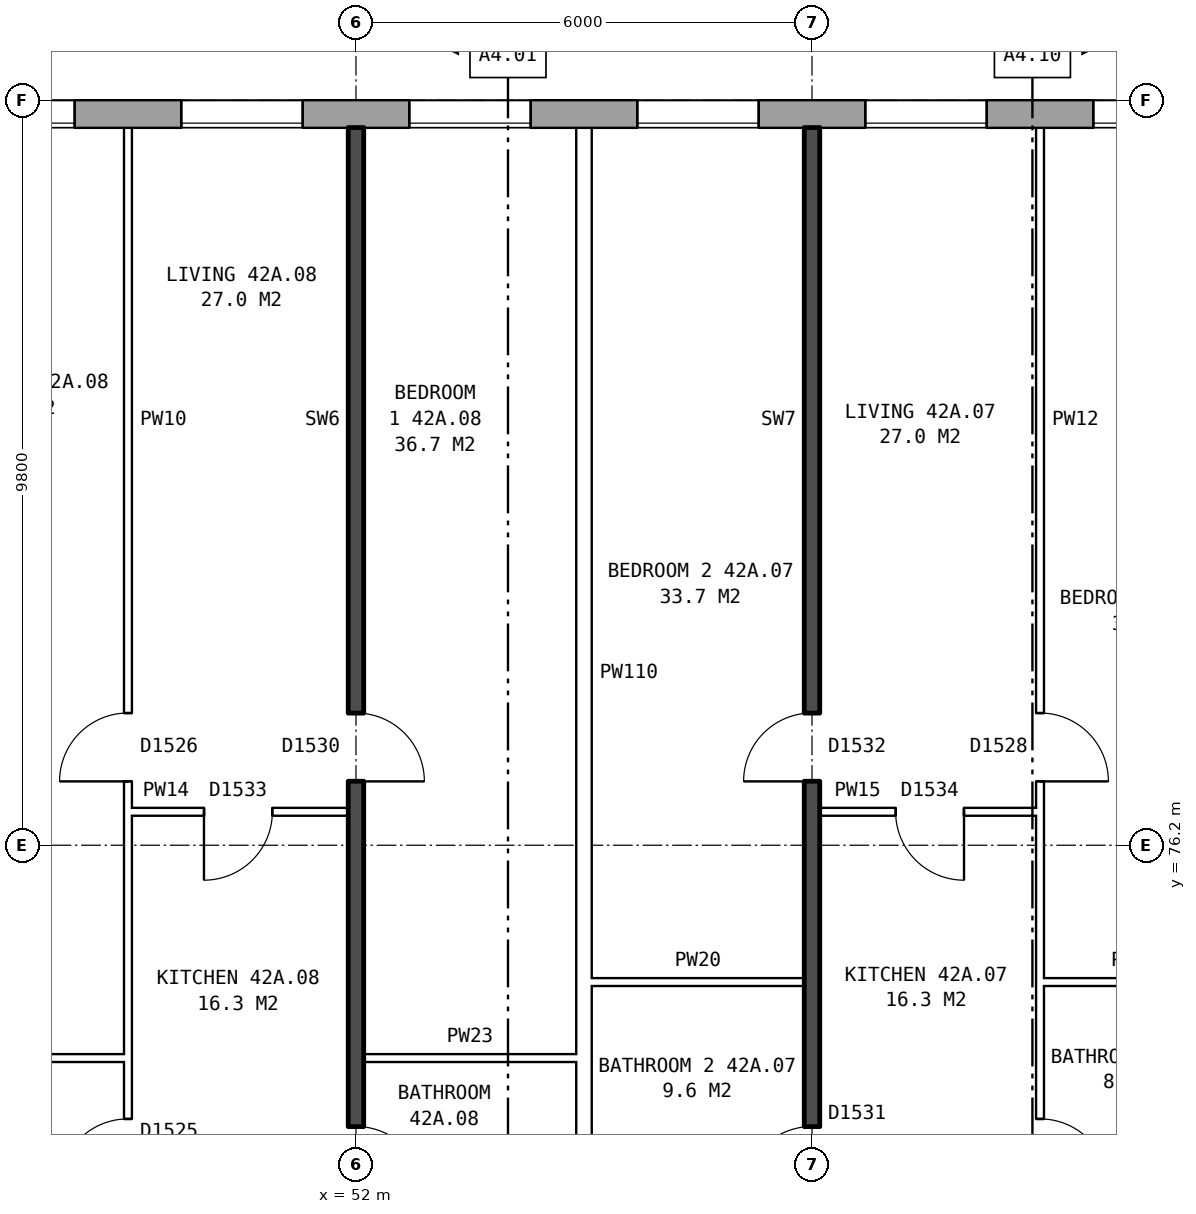
"""IFC4 building model, lengths in metres.
Left out: names, types, materials, properties, quantities, classifications, styles, units other than length and angle.
Written with IfcOpenShell. Run it as: python <this file> out.ifc"""

import sys

from ifc_helpers import new_model, si_unit, direction, frame, frame_2d, origin, place, context, subcontext, project, spatial, rectangle, extrude, element, fill, save


model = new_model("IFC4")
c1 = context("Model", 3, precision=1e-05, world=origin(), true_north=direction((0.0, 1.0)))
c2 = subcontext(c1, "Body", "Model", "MODEL_VIEW")
j1 = project(units=[si_unit("LENGTHUNIT", "METRE"), si_unit("PLANEANGLEUNIT", "RADIAN")], contexts=[c1])
p1 = place(None, origin())
s1 = spatial("IfcSite", under=j1, at=p1, CompositionType="ELEMENT")
p2 = place(p1, origin())
s2 = spatial("IfcBuilding", under=s1, at=p2, CompositionType="ELEMENT")
p3 = place(p2, frame((0.0, 0.0, 151.6)))
s3 = spatial("IfcBuildingStorey", under=s2, at=p3, CompositionType="ELEMENT", Elevation=151.6)
p4 = place(p3, frame((72.925, 85.82, 0.0), z_axis=(0.0, 0.0, 1.0), x_axis=(-1.0, 0.0, 0.0)))
e1 = element("IfcWall", 1, at=p4, inside=s3, PredefinedType="STANDARD", context=c2, shape_type="SweptSolid", body=[
    extrude(rectangle(XDim=41.351, YDim=0.36, at=frame_2d((20.675, 0.0))), origin(), (0.0, 0.0, 1.0), 2.85),
])
p5 = place(p4, frame((0.3, 0.0, 0.8)))
e2 = element("IfcOpeningElement", 2, at=p5, cuts=e1, PredefinedType="OPENING", context=c2, shape_type="SweptSolid", body=[
    extrude(rectangle(XDim=1.4, YDim=1.8, at=frame_2d((0.7, 0.9))), frame((0.0, 0.19, 0.0), z_axis=(0.0, -1.0, 0.0), x_axis=(1.0, 0.0, 0.0)), (0.0, 0.0, 1.0), 0.38),
])
p6 = place(p4, frame((4.225, 0.0, 0.8)))
e3 = element("IfcOpeningElement", 3, at=p6, cuts=e1, PredefinedType="OPENING", context=c2, shape_type="SweptSolid", body=[
    extrude(rectangle(XDim=1.0, YDim=0.9, at=frame_2d((0.5, 0.45))), frame((0.0, 0.19, 0.0), z_axis=(0.0, -1.0, 0.0), x_axis=(1.0, 0.0, 0.0)), (0.0, 0.0, 1.0), 0.38),
])
p7 = place(p4, frame((6.625, 0.0, 0.8)))
e4 = element("IfcOpeningElement", 4, at=p7, cuts=e1, PredefinedType="OPENING", context=c2, shape_type="SweptSolid", body=[
    extrude(rectangle(XDim=1.6, YDim=1.8, at=frame_2d((0.8, 0.9))), frame((0.0, 0.19, 0.0), z_axis=(0.0, -1.0, 0.0), x_axis=(1.0, 0.0, 0.0)), (0.0, 0.0, 1.0), 0.38),
])
p8 = place(p4, frame((9.625, 0.0, 0.8)))
e5 = element("IfcOpeningElement", 5, at=p8, cuts=e1, PredefinedType="OPENING", context=c2, shape_type="SweptSolid", body=[
    extrude(rectangle(XDim=1.6, YDim=1.8, at=frame_2d((0.8, 0.9))), frame((0.0, 0.19, 0.0), z_axis=(0.0, -1.0, 0.0), x_axis=(1.0, 0.0, 0.0)), (0.0, 0.0, 1.0), 0.38),
])
p9 = place(p4, frame((12.625, 0.0, 0.8)))
e6 = element("IfcOpeningElement", 6, at=p9, cuts=e1, PredefinedType="OPENING", context=c2, shape_type="SweptSolid", body=[
    extrude(rectangle(XDim=1.6, YDim=1.8, at=frame_2d((0.8, 0.9))), frame((0.0, 0.19, 0.0), z_axis=(0.0, -1.0, 0.0), x_axis=(1.0, 0.0, 0.0)), (0.0, 0.0, 1.0), 0.38),
])
p10 = place(p4, frame((15.625, 0.0, 0.8)))
e7 = element("IfcOpeningElement", 7, at=p10, cuts=e1, PredefinedType="OPENING", context=c2, shape_type="SweptSolid", body=[
    extrude(rectangle(XDim=1.6, YDim=1.8, at=frame_2d((0.8, 0.9))), frame((0.0, 0.19, 0.0), z_axis=(0.0, -1.0, 0.0), x_axis=(1.0, 0.0, 0.0)), (0.0, 0.0, 1.0), 0.38),
])
p11 = place(p4, frame((18.625, 0.0, 0.8)))
e8 = element("IfcOpeningElement", 8, at=p11, cuts=e1, PredefinedType="OPENING", context=c2, shape_type="SweptSolid", body=[
    extrude(rectangle(XDim=1.6, YDim=1.8, at=frame_2d((0.8, 0.9))), frame((0.0, 0.19, 0.0), z_axis=(0.0, -1.0, 0.0), x_axis=(1.0, 0.0, 0.0)), (0.0, 0.0, 1.0), 0.38),
])
p12 = place(p4, frame((21.625, 0.0, 0.8)))
e9 = element("IfcOpeningElement", 9, at=p12, cuts=e1, PredefinedType="OPENING", context=c2, shape_type="SweptSolid", body=[
    extrude(rectangle(XDim=1.6, YDim=1.8, at=frame_2d((0.8, 0.9))), frame((0.0, 0.19, 0.0), z_axis=(0.0, -1.0, 0.0), x_axis=(1.0, 0.0, 0.0)), (0.0, 0.0, 1.0), 0.38),
])
p13 = place(p4, frame((24.625, 0.0, 0.8)))
e10 = element("IfcOpeningElement", 10, at=p13, cuts=e1, PredefinedType="OPENING", context=c2, shape_type="SweptSolid", body=[
    extrude(rectangle(XDim=1.6, YDim=1.8, at=frame_2d((0.8, 0.9))), frame((0.0, 0.19, 0.0), z_axis=(0.0, -1.0, 0.0), x_axis=(1.0, 0.0, 0.0)), (0.0, 0.0, 1.0), 0.38),
])
p14 = place(p4, frame((27.625, 0.0, 0.8)))
e11 = element("IfcOpeningElement", 11, at=p14, cuts=e1, PredefinedType="OPENING", context=c2, shape_type="SweptSolid", body=[
    extrude(rectangle(XDim=1.6, YDim=1.8, at=frame_2d((0.8, 0.9))), frame((0.0, 0.19, 0.0), z_axis=(0.0, -1.0, 0.0), x_axis=(1.0, 0.0, 0.0)), (0.0, 0.0, 1.0), 0.38),
])
p15 = place(p4, frame((30.625, 0.0, 0.8)))
e12 = element("IfcOpeningElement", 12, at=p15, cuts=e1, PredefinedType="OPENING", context=c2, shape_type="SweptSolid", body=[
    extrude(rectangle(XDim=1.6, YDim=1.8, at=frame_2d((0.8, 0.9))), frame((0.0, 0.19, 0.0), z_axis=(0.0, -1.0, 0.0), x_axis=(1.0, 0.0, 0.0)), (0.0, 0.0, 1.0), 0.38),
])
p16 = place(p4, frame((33.625, 0.0, 0.8)))
e13 = element("IfcOpeningElement", 13, at=p16, cuts=e1, PredefinedType="OPENING", context=c2, shape_type="SweptSolid", body=[
    extrude(rectangle(XDim=1.6, YDim=1.8, at=frame_2d((0.8, 0.9))), frame((0.0, 0.19, 0.0), z_axis=(0.0, -1.0, 0.0), x_axis=(1.0, 0.0, 0.0)), (0.0, 0.0, 1.0), 0.38),
])
p17 = place(p4, frame((35.525, 0.0, 0.8)))
e14 = element("IfcOpeningElement", 14, at=p17, cuts=e1, PredefinedType="OPENING", context=c2, shape_type="SweptSolid", body=[
    extrude(rectangle(XDim=1.2, YDim=1.2, at=frame_2d((0.6, 0.6))), frame((0.0, 0.19, 0.0), z_axis=(0.0, -1.0, 0.0), x_axis=(1.0, 0.0, 0.0)), (0.0, 0.0, 1.0), 0.38),
])
p18 = place(p4, frame((2.0, 0.0, 1.4)))
e15 = element("IfcOpeningElement", 15, at=p18, cuts=e1, PredefinedType="OPENING", context=c2, shape_type="SweptSolid", body=[
    extrude(rectangle(XDim=0.6, YDim=1.2, at=frame_2d((0.3, 0.6))), frame((0.0, 0.19, 0.0), z_axis=(0.0, -1.0, 0.0), x_axis=(1.0, 0.0, 0.0)), (0.0, 0.0, 1.0), 0.38),
])
p19 = place(p4, frame((5.525, 0.0, 0.8)))
e16 = element("IfcOpeningElement", 16, at=p19, cuts=e1, PredefinedType="OPENING", context=c2, shape_type="SweptSolid", body=[
    extrude(rectangle(XDim=0.8, YDim=1.8, at=frame_2d((0.4, 0.9))), frame((0.0, 0.19, 0.0), z_axis=(0.0, -1.0, 0.0), x_axis=(1.0, 0.0, 0.0)), (0.0, 0.0, 1.0), 0.38),
])
p20 = place(p3, frame((46.1, 73.4, 0.0), z_axis=(0.0, 0.0, 1.0), x_axis=(1.0, 0.0, 0.0)))
e17 = element("IfcWall", 17, at=p20, inside=s3, PredefinedType="PARTITIONING", context=c2, shape_type="SweptSolid", body=[
    extrude(rectangle(XDim=2.9, YDim=0.1, at=frame_2d((1.45, 0.0))), origin(), (0.0, 0.0, 1.0), 2.85),
])
for number, where, z_axis, x_axis in (
    (18, (52.1, 73.4, 0.0), (0.0, 0.0, 1.0), (1.0, 0.0, 0.0)),
    (19, (55.1, 74.4, 0.0), (0.0, 0.0, 1.0), (1.0, 0.0, 0.0)),
):
    element("IfcWall", number, at=place(p3, frame(where, z_axis=z_axis, x_axis=x_axis)), inside=s3, PredefinedType="PARTITIONING", context=c2, shape_type="SweptSolid", body=[
        extrude(rectangle(XDim=2.8, YDim=0.1, at=frame_2d((1.4, 0.0))), origin(), (0.0, 0.0, 1.0), 2.85),
    ])
p21 = place(p3, frame((61.0, 74.4, 0.0), z_axis=(0.0, 0.0, 1.0), x_axis=(1.0, 0.0, 0.0)))
e20 = element("IfcWall", 20, at=p21, inside=s3, PredefinedType="PARTITIONING", context=c2, shape_type="SweptSolid", body=[
    extrude(rectangle(XDim=2.64, YDim=0.1, at=frame_2d((1.32, 0.0))), origin(), (0.0, 0.0, 1.0), 2.85),
])
p22 = place(p3, frame((49.0, 76.64, 0.0), z_axis=(0.0, 0.0, 1.0), x_axis=(1.0, 0.0, 0.0)))
e21 = element("IfcWall", 21, at=p22, inside=s3, PredefinedType="PARTITIONING", context=c2, shape_type="SweptSolid", body=[
    extrude(rectangle(XDim=2.9, YDim=0.1, at=frame_2d((1.45, 0.0))), origin(), (0.0, 0.0, 1.0), 2.85),
])
p23 = place(p22, frame((1.0, 0.0, 0.0)))
e22 = element("IfcOpeningElement", 22, at=p23, cuts=e21, PredefinedType="OPENING", context=c2, shape_type="SweptSolid", body=[
    extrude(rectangle(XDim=0.9, YDim=2.1, at=frame_2d((0.45, 1.05))), frame((0.0, 0.06, 0.0), z_axis=(0.0, -1.0, 0.0), x_axis=(1.0, 0.0, 0.0)), (0.0, 0.0, 1.0), 0.12),
])
p24 = place(p3, frame((58.1, 76.64, 0.0), z_axis=(0.0, 0.0, 1.0), x_axis=(1.0, 0.0, 0.0)))
e23 = element("IfcWall", 23, at=p24, inside=s3, PredefinedType="PARTITIONING", context=c2, shape_type="SweptSolid", body=[
    extrude(rectangle(XDim=2.9, YDim=0.1, at=frame_2d((1.45, 0.0))), origin(), (0.0, 0.0, 1.0), 2.85),
])
p25 = place(p24, frame((1.0, 0.0, 0.0)))
e24 = element("IfcOpeningElement", 24, at=p25, cuts=e23, PredefinedType="OPENING", context=c2, shape_type="SweptSolid", body=[
    extrude(rectangle(XDim=0.9, YDim=2.1, at=frame_2d((0.45, 1.05))), frame((0.0, 0.06, 0.0), z_axis=(0.0, -1.0, 0.0), x_axis=(1.0, 0.0, 0.0)), (0.0, 0.0, 1.0), 0.12),
])
p26 = place(p3, frame((49.0, 71.3, 0.0), z_axis=(0.0, 0.0, 1.0), x_axis=(0.0, 1.0, 0.0)))
e25 = element("IfcWall", 25, at=p26, inside=s3, PredefinedType="PARTITIONING", context=c2, shape_type="SweptSolid", body=[
    extrude(rectangle(XDim=14.34, YDim=0.1, at=frame_2d((7.17, 0.0))), origin(), (0.0, 0.0, 1.0), 2.85),
])
p27 = place(p26, frame((5.74, 0.0, 0.0)))
e26 = element("IfcOpeningElement", 26, at=p27, cuts=e25, PredefinedType="OPENING", context=c2, shape_type="SweptSolid", body=[
    extrude(rectangle(XDim=0.9, YDim=2.1, at=frame_2d((0.45, 1.05))), frame((0.0, 0.06, 0.0), z_axis=(0.0, -1.0, 0.0), x_axis=(1.0, 0.0, 0.0)), (0.0, 0.0, 1.0), 0.12),
])
p28 = place(p26, frame((0.4, 0.0, 0.0)))
e27 = element("IfcOpeningElement", 27, at=p28, cuts=e25, PredefinedType="OPENING", context=c2, shape_type="SweptSolid", body=[
    extrude(rectangle(XDim=0.9, YDim=2.1, at=frame_2d((0.45, 1.05))), frame((0.0, 0.06, 0.0), z_axis=(0.0, -1.0, 0.0), x_axis=(1.0, 0.0, 0.0)), (0.0, 0.0, 1.0), 0.12),
])
p29 = place(p3, frame((52.0, 71.2, 0.0), z_axis=(0.0, 0.0, 1.0), x_axis=(0.0, 1.0, 0.0)))
e28 = element("IfcWall", 28, at=p29, inside=s3, PredefinedType="SOLIDWALL", context=c2, shape_type="SweptSolid", body=[
    extrude(rectangle(XDim=14.44, YDim=0.2, at=frame_2d((7.22, 0.0))), origin(), (0.0, 0.0, 1.0), 2.85),
])
p30 = place(p29, frame((5.84, 0.0, 0.0)))
e29 = element("IfcOpeningElement", 29, at=p30, cuts=e28, PredefinedType="OPENING", context=c2, shape_type="SweptSolid", body=[
    extrude(rectangle(XDim=0.9, YDim=2.1, at=frame_2d((0.45, 1.05))), frame((0.0, 0.11, 0.0), z_axis=(0.0, -1.0, 0.0), x_axis=(1.0, 0.0, 0.0)), (0.0, 0.0, 1.0), 0.22),
])
p31 = place(p29, frame((0.4, 0.0, 0.0)))
e30 = element("IfcOpeningElement", 30, at=p31, cuts=e28, PredefinedType="OPENING", context=c2, shape_type="SweptSolid", body=[
    extrude(rectangle(XDim=0.9, YDim=2.1, at=frame_2d((0.45, 1.05))), frame((0.0, 0.11, 0.0), z_axis=(0.0, -1.0, 0.0), x_axis=(1.0, 0.0, 0.0)), (0.0, 0.0, 1.0), 0.22),
])
p32 = place(p3, frame((55.0, 71.3, 0.0), z_axis=(0.0, 0.0, 1.0), x_axis=(0.0, 1.0, 0.0)))
e31 = element("IfcWall", 31, at=p32, inside=s3, PredefinedType="PARTITIONING", context=c2, shape_type="SweptSolid", body=[
    extrude(rectangle(XDim=14.34, YDim=0.2, at=frame_2d((7.17, 0.0))), origin(), (0.0, 0.0, 1.0), 2.85),
])
p33 = place(p3, frame((58.0, 71.2, 0.0), z_axis=(0.0, 0.0, 1.0), x_axis=(0.0, 1.0, 0.0)))
e32 = element("IfcWall", 32, at=p33, inside=s3, PredefinedType="SOLIDWALL", context=c2, shape_type="SweptSolid", body=[
    extrude(rectangle(XDim=14.44, YDim=0.2, at=frame_2d((7.22, 0.0))), origin(), (0.0, 0.0, 1.0), 2.85),
])
p34 = place(p33, frame((5.84, 0.0, 0.0)))
e33 = element("IfcOpeningElement", 33, at=p34, cuts=e32, PredefinedType="OPENING", context=c2, shape_type="SweptSolid", body=[
    extrude(rectangle(XDim=0.9, YDim=2.1, at=frame_2d((0.45, 1.05))), frame((0.0, 0.11, 0.0), z_axis=(0.0, -1.0, 0.0), x_axis=(1.0, 0.0, 0.0)), (0.0, 0.0, 1.0), 0.22),
])
p35 = place(p33, frame((0.4, 0.0, 0.0)))
e34 = element("IfcOpeningElement", 34, at=p35, cuts=e32, PredefinedType="OPENING", context=c2, shape_type="SweptSolid", body=[
    extrude(rectangle(XDim=0.9, YDim=2.1, at=frame_2d((0.45, 1.05))), frame((0.0, 0.11, 0.0), z_axis=(0.0, -1.0, 0.0), x_axis=(1.0, 0.0, 0.0)), (0.0, 0.0, 1.0), 0.22),
])
p36 = place(p3, frame((61.0, 71.3, 0.0), z_axis=(0.0, 0.0, 1.0), x_axis=(0.0, 1.0, 0.0)))
e35 = element("IfcWall", 35, at=p36, inside=s3, PredefinedType="PARTITIONING", context=c2, shape_type="SweptSolid", body=[
    extrude(rectangle(XDim=14.34, YDim=0.1, at=frame_2d((7.17, 0.0))), origin(), (0.0, 0.0, 1.0), 2.85),
])
p37 = place(p36, frame((5.74, 0.0, 0.0)))
e36 = element("IfcOpeningElement", 36, at=p37, cuts=e35, PredefinedType="OPENING", context=c2, shape_type="SweptSolid", body=[
    extrude(rectangle(XDim=0.9, YDim=2.1, at=frame_2d((0.45, 1.05))), frame((0.0, 0.06, 0.0), z_axis=(0.0, -1.0, 0.0), x_axis=(1.0, 0.0, 0.0)), (0.0, 0.0, 1.0), 0.12),
])
p38 = place(p36, frame((0.4, 0.0, 0.0)))
e37 = element("IfcOpeningElement", 37, at=p38, cuts=e35, PredefinedType="OPENING", context=c2, shape_type="SweptSolid", body=[
    extrude(rectangle(XDim=0.9, YDim=2.1, at=frame_2d((0.45, 1.05))), frame((0.0, 0.06, 0.0), z_axis=(0.0, -1.0, 0.0), x_axis=(1.0, 0.0, 0.0)), (0.0, 0.0, 1.0), 0.12),
])
p39 = place(p8, origin())
e38 = element("IfcWindow", 38, at=p39, inside=s3, PartitioningType="SINGLE_PANEL", PredefinedType="WINDOW", context=c2, shape_type="SweptSolid", body=[
    extrude(rectangle(XDim=1.6, YDim=1.8, at=frame_2d((0.8, 0.9))), frame((0.0, 0.15, 0.0), z_axis=(0.0, -1.0, 0.0), x_axis=(1.0, 0.0, 0.0)), (0.0, 0.0, 1.0), 0.06),
])
fill(e5, e38)
p40 = place(p9, origin())
e39 = element("IfcWindow", 39, at=p40, inside=s3, PartitioningType="SINGLE_PANEL", PredefinedType="WINDOW", context=c2, shape_type="SweptSolid", body=[
    extrude(rectangle(XDim=1.6, YDim=1.8, at=frame_2d((0.8, 0.9))), frame((0.0, 0.15, 0.0), z_axis=(0.0, -1.0, 0.0), x_axis=(1.0, 0.0, 0.0)), (0.0, 0.0, 1.0), 0.06),
])
fill(e6, e39)
p41 = place(p10, origin())
e40 = element("IfcWindow", 40, at=p41, inside=s3, PartitioningType="SINGLE_PANEL", PredefinedType="WINDOW", context=c2, shape_type="SweptSolid", body=[
    extrude(rectangle(XDim=1.6, YDim=1.8, at=frame_2d((0.8, 0.9))), frame((0.0, 0.15, 0.0), z_axis=(0.0, -1.0, 0.0), x_axis=(1.0, 0.0, 0.0)), (0.0, 0.0, 1.0), 0.06),
])
fill(e7, e40)
p42 = place(p11, origin())
e41 = element("IfcWindow", 41, at=p42, inside=s3, PartitioningType="SINGLE_PANEL", PredefinedType="WINDOW", context=c2, shape_type="SweptSolid", body=[
    extrude(rectangle(XDim=1.6, YDim=1.8, at=frame_2d((0.8, 0.9))), frame((0.0, 0.15, 0.0), z_axis=(0.0, -1.0, 0.0), x_axis=(1.0, 0.0, 0.0)), (0.0, 0.0, 1.0), 0.06),
])
fill(e8, e41)
p43 = place(p12, origin())
e42 = element("IfcWindow", 42, at=p43, inside=s3, PartitioningType="SINGLE_PANEL", PredefinedType="WINDOW", context=c2, shape_type="SweptSolid", body=[
    extrude(rectangle(XDim=1.6, YDim=1.8, at=frame_2d((0.8, 0.9))), frame((0.0, 0.15, 0.0), z_axis=(0.0, -1.0, 0.0), x_axis=(1.0, 0.0, 0.0)), (0.0, 0.0, 1.0), 0.06),
])
fill(e9, e42)
p44 = place(p13, origin())
e43 = element("IfcWindow", 43, at=p44, inside=s3, PartitioningType="SINGLE_PANEL", PredefinedType="WINDOW", context=c2, shape_type="SweptSolid", body=[
    extrude(rectangle(XDim=1.6, YDim=1.8, at=frame_2d((0.8, 0.9))), frame((0.0, 0.15, 0.0), z_axis=(0.0, -1.0, 0.0), x_axis=(1.0, 0.0, 0.0)), (0.0, 0.0, 1.0), 0.06),
])
fill(e10, e43)
p45 = place(p37, frame((0.9, 0.0, 0.0), z_axis=(0.0, 0.0, 1.0), x_axis=(-1.0, 0.0, 0.0)))
e44 = element("IfcDoor", 44, at=p45, inside=s3, OperationType="SINGLE_SWING_RIGHT", PredefinedType="DOOR", context=c2, shape_type="SweptSolid", body=[
    extrude(rectangle(XDim=0.9, YDim=2.1, at=frame_2d((0.45, 1.05))), frame((0.0, 0.025, 0.0), z_axis=(0.0, -1.0, 0.0), x_axis=(1.0, 0.0, 0.0)), (0.0, 0.0, 1.0), 0.05),
])
fill(e36, e44)
p46 = place(p34, origin())
e45 = element("IfcDoor", 45, at=p46, inside=s3, OperationType="SINGLE_SWING_LEFT", PredefinedType="DOOR", context=c2, shape_type="SweptSolid", body=[
    extrude(rectangle(XDim=0.9, YDim=2.1, at=frame_2d((0.45, 1.05))), frame((0.0, 0.025, 0.0), z_axis=(0.0, -1.0, 0.0), x_axis=(1.0, 0.0, 0.0)), (0.0, 0.0, 1.0), 0.05),
])
fill(e33, e45)
p47 = place(p25, frame((0.9, 0.0, 0.0), z_axis=(0.0, 0.0, 1.0), x_axis=(-1.0, 0.0, 0.0)))
e46 = element("IfcDoor", 46, at=p47, inside=s3, OperationType="SINGLE_SWING_LEFT", PredefinedType="DOOR", context=c2, shape_type="SweptSolid", body=[
    extrude(rectangle(XDim=0.9, YDim=2.1, at=frame_2d((0.45, 1.05))), frame((0.0, 0.025, 0.0), z_axis=(0.0, -1.0, 0.0), x_axis=(1.0, 0.0, 0.0)), (0.0, 0.0, 1.0), 0.05),
])
fill(e24, e46)
p48 = place(p38, frame((0.9, 0.0, 0.0), z_axis=(0.0, 0.0, 1.0), x_axis=(-1.0, 0.0, 0.0)))
e47 = element("IfcDoor", 47, at=p48, inside=s3, OperationType="SINGLE_SWING_RIGHT", PredefinedType="DOOR", context=c2, shape_type="SweptSolid", body=[
    extrude(rectangle(XDim=0.9, YDim=2.1, at=frame_2d((0.45, 1.05))), frame((0.0, 0.025, 0.0), z_axis=(0.0, -1.0, 0.0), x_axis=(1.0, 0.0, 0.0)), (0.0, 0.0, 1.0), 0.05),
])
fill(e37, e47)
p49 = place(p35, origin())
e48 = element("IfcDoor", 48, at=p49, inside=s3, OperationType="SINGLE_SWING_LEFT", PredefinedType="DOOR", context=c2, shape_type="SweptSolid", body=[
    extrude(rectangle(XDim=0.9, YDim=2.1, at=frame_2d((0.45, 1.05))), frame((0.0, 0.025, 0.0), z_axis=(0.0, -1.0, 0.0), x_axis=(1.0, 0.0, 0.0)), (0.0, 0.0, 1.0), 0.05),
])
fill(e34, e48)
p50 = place(p30, frame((0.9, 0.0, 0.0), z_axis=(0.0, 0.0, 1.0), x_axis=(-1.0, 0.0, 0.0)))
e49 = element("IfcDoor", 49, at=p50, inside=s3, OperationType="SINGLE_SWING_RIGHT", PredefinedType="DOOR", context=c2, shape_type="SweptSolid", body=[
    extrude(rectangle(XDim=0.9, YDim=2.1, at=frame_2d((0.45, 1.05))), frame((0.0, 0.025, 0.0), z_axis=(0.0, -1.0, 0.0), x_axis=(1.0, 0.0, 0.0)), (0.0, 0.0, 1.0), 0.05),
])
fill(e29, e49)
p51 = place(p27, origin())
e50 = element("IfcDoor", 50, at=p51, inside=s3, OperationType="SINGLE_SWING_LEFT", PredefinedType="DOOR", context=c2, shape_type="SweptSolid", body=[
    extrude(rectangle(XDim=0.9, YDim=2.1, at=frame_2d((0.45, 1.05))), frame((0.0, 0.025, 0.0), z_axis=(0.0, -1.0, 0.0), x_axis=(1.0, 0.0, 0.0)), (0.0, 0.0, 1.0), 0.05),
])
fill(e26, e50)
p52 = place(p23, frame((0.9, 0.0, 0.0), z_axis=(0.0, 0.0, 1.0), x_axis=(-1.0, 0.0, 0.0)))
e51 = element("IfcDoor", 51, at=p52, inside=s3, OperationType="SINGLE_SWING_RIGHT", PredefinedType="DOOR", context=c2, shape_type="SweptSolid", body=[
    extrude(rectangle(XDim=0.9, YDim=2.1, at=frame_2d((0.45, 1.05))), frame((0.0, 0.025, 0.0), z_axis=(0.0, -1.0, 0.0), x_axis=(1.0, 0.0, 0.0)), (0.0, 0.0, 1.0), 0.05),
])
fill(e22, e51)
p53 = place(p31, frame((0.9, 0.0, 0.0), z_axis=(0.0, 0.0, 1.0), x_axis=(-1.0, 0.0, 0.0)))
e52 = element("IfcDoor", 52, at=p53, inside=s3, OperationType="SINGLE_SWING_RIGHT", PredefinedType="DOOR", context=c2, shape_type="SweptSolid", body=[
    extrude(rectangle(XDim=0.9, YDim=2.1, at=frame_2d((0.45, 1.05))), frame((0.0, 0.025, 0.0), z_axis=(0.0, -1.0, 0.0), x_axis=(1.0, 0.0, 0.0)), (0.0, 0.0, 1.0), 0.05),
])
fill(e30, e52)
p54 = place(p28, origin())
e53 = element("IfcDoor", 53, at=p54, inside=s3, OperationType="SINGLE_SWING_LEFT", PredefinedType="DOOR", context=c2, shape_type="SweptSolid", body=[
    extrude(rectangle(XDim=0.9, YDim=2.1, at=frame_2d((0.45, 1.05))), frame((0.0, 0.025, 0.0), z_axis=(0.0, -1.0, 0.0), x_axis=(1.0, 0.0, 0.0)), (0.0, 0.0, 1.0), 0.05),
])
fill(e27, e53)
save(model, sys.argv[1])
